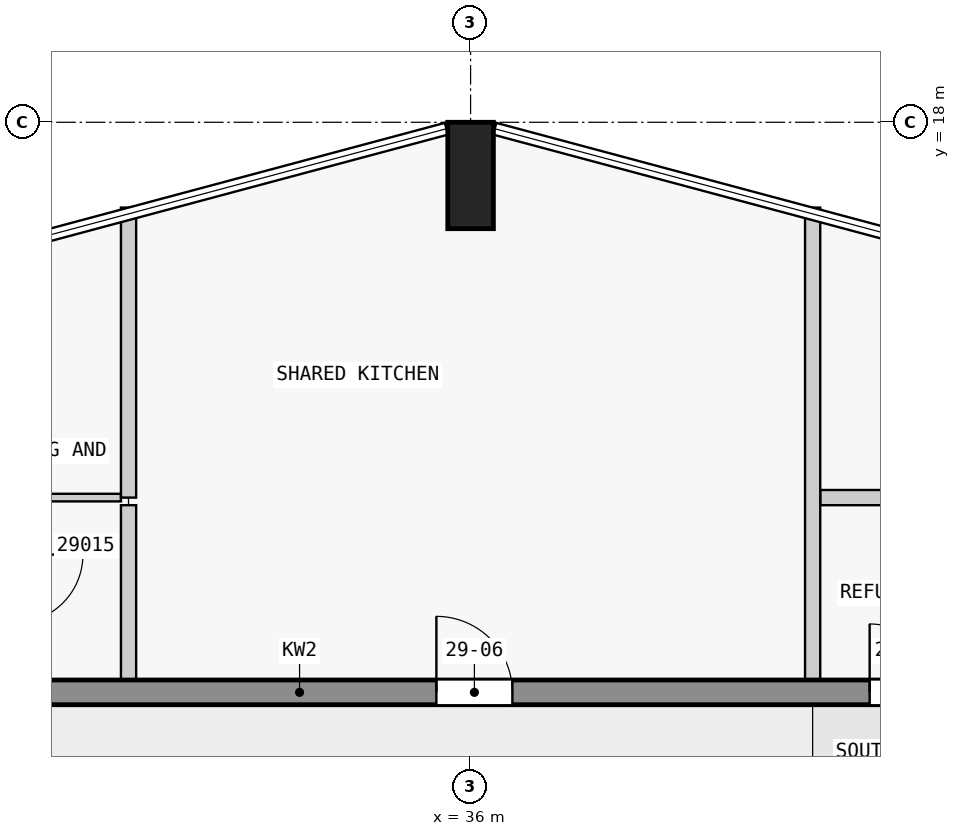
"""IFC4 building model, lengths in metres.
Left out: names, types, materials, properties, quantities, classifications, styles, units other than length and angle.
Written with IfcOpenShell. Run it as: python <this file> out.ifc"""

import sys

from ifc_helpers import new_model, si_unit, direction, frame, frame_2d, origin, origin_2d, place, context, subcontext, project, spatial, rectangle, extrude, element, fill, save


model = new_model("IFC4")
c1 = context("Model", 3, precision=1e-05, world=origin(), true_north=direction((0.0, 1.0)))
c2 = subcontext(c1, "Body", "Model", "MODEL_VIEW")
j1 = project(units=[si_unit("LENGTHUNIT", "METRE"), si_unit("PLANEANGLEUNIT", "RADIAN")], contexts=[c1])
p1 = place(None, origin())
s1 = spatial("IfcSite", under=j1, at=p1, CompositionType="ELEMENT")
p2 = place(p1, origin())
s2 = spatial("IfcBuilding", under=s1, at=p2, CompositionType="ELEMENT")
p3 = place(p2, frame((0.0, 0.0, 113.3)))
s3 = spatial("IfcBuildingStorey", under=s2, at=p3, CompositionType="ELEMENT", Elevation=113.3)
p4 = place(p3, frame((36.0, 17.3, 0.0), z_axis=(0.0, 0.0, 1.0), x_axis=(1.0, 0.0, 0.0)))
e1 = element("IfcColumn", 1, at=p4, inside=s3, PredefinedType="COLUMN", context=c2, shape_type="SweptSolid", body=[
    extrude(rectangle(XDim=0.6, YDim=1.4, at=origin_2d()), origin(), (0.0, 0.0, 1.0), 3.5),
])
p5 = place(p3, frame((22.5, 10.5, 0.0), z_axis=(0.0, 0.0, 1.0), x_axis=(1.0, 0.0, 0.0)))
e2 = element("IfcWall", 2, at=p5, inside=s3, PredefinedType="SHEAR", context=c2, shape_type="SweptSolid", body=[
    extrude(rectangle(XDim=22.5, YDim=0.325, at=frame_2d((11.25, 0.0))), origin(), (0.0, 0.0, 1.0), 3.25),
])
p6 = place(p5, frame((1.85, 0.0, 0.0)))
e3 = element("IfcOpeningElement", 3, at=p6, cuts=e2, PredefinedType="OPENING", context=c2, shape_type="SweptSolid", body=[
    extrude(rectangle(XDim=0.9, YDim=2.1, at=frame_2d((0.45, 1.05))), frame((0.0, 0.172, 0.0), z_axis=(0.0, -1.0, 0.0), x_axis=(1.0, 0.0, 0.0)), (0.0, 0.0, 1.0), 0.345),
])
p7 = place(p5, frame((6.25, 0.0, 0.0)))
e4 = element("IfcOpeningElement", 4, at=p7, cuts=e2, PredefinedType="OPENING", context=c2, shape_type="SweptSolid", body=[
    extrude(rectangle(XDim=1.0, YDim=2.1, at=frame_2d((0.5, 1.05))), frame((0.0, 0.172, 0.0), z_axis=(0.0, -1.0, 0.0), x_axis=(1.0, 0.0, 0.0)), (0.0, 0.0, 1.0), 0.345),
])
p8 = place(p5, frame((13.05, 0.0, 0.0)))
e5 = element("IfcOpeningElement", 5, at=p8, cuts=e2, PredefinedType="OPENING", context=c2, shape_type="SweptSolid", body=[
    extrude(rectangle(XDim=1.0, YDim=2.1, at=frame_2d((0.5, 1.05))), frame((0.0, 0.172, 0.0), z_axis=(0.0, -1.0, 0.0), x_axis=(1.0, 0.0, 0.0)), (0.0, 0.0, 1.0), 0.345),
])
p9 = place(p5, frame((18.75, 0.0, 0.0)))
e6 = element("IfcOpeningElement", 6, at=p9, cuts=e2, PredefinedType="OPENING", context=c2, shape_type="SweptSolid", body=[
    extrude(rectangle(XDim=0.9, YDim=2.1, at=frame_2d((0.45, 1.05))), frame((0.0, 0.172, 0.0), z_axis=(0.0, -1.0, 0.0), x_axis=(1.0, 0.0, 0.0)), (0.0, 0.0, 1.0), 0.345),
])
p10 = place(p5, frame((20.95, 0.0, 0.0)))
e7 = element("IfcOpeningElement", 7, at=p10, cuts=e2, PredefinedType="OPENING", context=c2, shape_type="SweptSolid", body=[
    extrude(rectangle(XDim=1.0, YDim=2.1, at=frame_2d((0.5, 1.05))), frame((0.0, 0.172, 0.0), z_axis=(0.0, -1.0, 0.0), x_axis=(1.0, 0.0, 0.0)), (0.0, 0.0, 1.0), 0.345),
])
p11 = place(p3, frame((31.4, 13.062, 0.0), z_axis=(0.0, 0.0, 1.0), x_axis=(-1.0, 0.0, 0.0)))
e8 = element("IfcWall", 8, at=p11, inside=s3, PredefinedType="PARTITIONING", context=c2, shape_type="SweptSolid", body=[
    extrude(rectangle(XDim=1.35, YDim=0.1, at=frame_2d((0.675, 0.0))), origin(), (0.0, 0.0, 1.0), 3.25),
])
p12 = place(p3, frame((42.9, 13.062, 0.0), z_axis=(0.0, 0.0, 1.0), x_axis=(-1.0, 0.0, 0.0)))
e9 = element("IfcWall", 9, at=p12, inside=s3, PredefinedType="PARTITIONING", context=c2, shape_type="SweptSolid", body=[
    extrude(rectangle(XDim=2.3, YDim=0.2, at=frame_2d((1.15, 0.0))), origin(), (0.0, 0.0, 1.0), 3.25),
])
p13 = place(p3, frame((31.5, 16.878, 0.0), z_axis=(0.0, 0.0, 1.0), x_axis=(0.0, -1.0, 0.0)))
e10 = element("IfcWall", 10, at=p13, inside=s3, PredefinedType="PARTITIONING", context=c2, shape_type="SweptSolid", body=[
    extrude(rectangle(XDim=3.815, YDim=0.2, at=frame_2d((1.908, 0.0))), origin(), (0.0, 0.0, 1.0), 3.25),
])
p14 = place(p3, frame((31.5, 10.663, 0.0), z_axis=(0.0, 0.0, 1.0), x_axis=(0.0, 1.0, 0.0)))
e11 = element("IfcWall", 11, at=p14, inside=s3, PredefinedType="PARTITIONING", context=c2, shape_type="SweptSolid", body=[
    extrude(rectangle(XDim=2.3, YDim=0.2, at=frame_2d((1.15, 0.0))), origin(), (0.0, 0.0, 1.0), 3.25),
])
p15 = place(p3, frame((40.5, 10.663, 0.0), z_axis=(0.0, 0.0, 1.0), x_axis=(0.0, 1.0, 0.0)))
e12 = element("IfcWall", 12, at=p15, inside=s3, PredefinedType="PARTITIONING", context=c2, shape_type="SweptSolid", body=[
    extrude(rectangle(XDim=6.215, YDim=0.2, at=frame_2d((3.107, 0.0))), origin(), (0.0, 0.0, 1.0), 3.25),
])
p16 = place(p8, origin())
e13 = element("IfcDoor", 13, at=p16, inside=s3, OperationType="SINGLE_SWING_RIGHT", PredefinedType="DOOR", context=c2, shape_type="SweptSolid", body=[
    extrude(rectangle(XDim=1.0, YDim=2.1, at=frame_2d((0.5, 1.05))), frame((0.0, 0.025, 0.0), z_axis=(0.0, -1.0, 0.0), x_axis=(1.0, 0.0, 0.0)), (0.0, 0.0, 1.0), 0.05),
])
fill(e5, e13)
p17 = place(p9, origin())
e14 = element("IfcDoor", 14, at=p17, inside=s3, OperationType="SINGLE_SWING_RIGHT", PredefinedType="DOOR", context=c2, shape_type="SweptSolid", body=[
    extrude(rectangle(XDim=0.9, YDim=2.1, at=frame_2d((0.45, 1.05))), frame((0.0, 0.025, 0.0), z_axis=(0.0, -1.0, 0.0), x_axis=(1.0, 0.0, 0.0)), (0.0, 0.0, 1.0), 0.05),
])
fill(e6, e14)
save(model, sys.argv[1])
